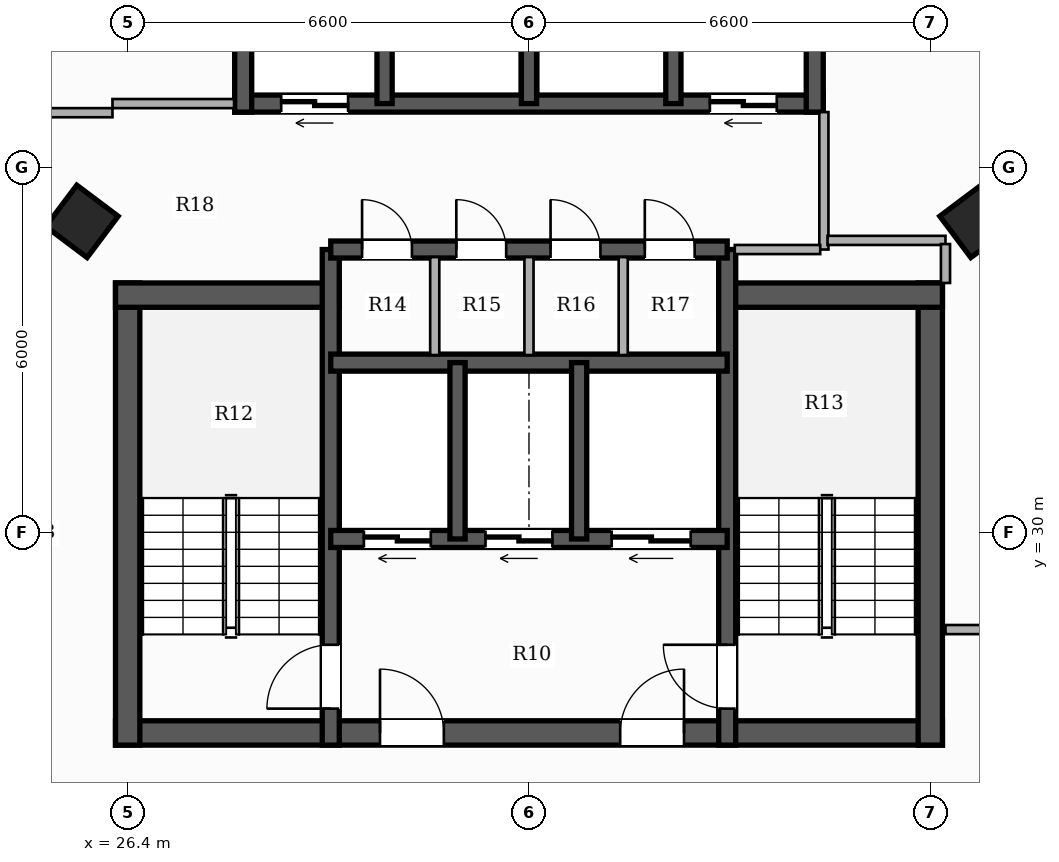
"""IFC4 building model, lengths in metres.
Left out: names, types, materials, properties, quantities, classifications, styles, units other than length and angle.
Written with IfcOpenShell. Run it as: python <this file> out.ifc"""

import sys

from ifc_helpers import new_model, si_unit, direction, frame, frame_2d, origin, origin_2d, place, context, subcontext, project, spatial, rectangle, hollow_rectangle, extrude, element, fill, save


model = new_model("IFC4")
c1 = context("Model", 3, precision=1e-05, world=origin(), true_north=direction((0.0, 1.0)))
c2 = subcontext(c1, "Body", "Model", "MODEL_VIEW")
j1 = project(units=[si_unit("LENGTHUNIT", "METRE"), si_unit("PLANEANGLEUNIT", "RADIAN")], contexts=[c1])
p1 = place(None, origin())
s1 = spatial("IfcSite", under=j1, at=p1, CompositionType="ELEMENT")
p2 = place(p1, origin())
s2 = spatial("IfcBuilding", under=s1, at=p2, CompositionType="ELEMENT")
p3 = place(p2, frame((0.0, 0.0, 157.25)))
s3 = spatial("IfcBuildingStorey", under=s2, at=p3, CompositionType="ELEMENT", Elevation=157.25)
p4 = place(p3, frame((26.2, 26.7, 0.0), z_axis=(0.0, 0.0, 1.0), x_axis=(1.0, 0.0, 0.0)))
e1 = element("IfcWall", 1, at=p4, inside=s3, PredefinedType="SHEAR", context=c2, shape_type="SweptSolid", body=[
    extrude(rectangle(XDim=13.6, YDim=0.4, at=frame_2d((6.8, 0.0))), origin(), (0.0, 0.0, 1.0), 3.3),
])
p5 = place(p4, frame((4.35, 0.0, 0.0)))
e2 = element("IfcOpeningElement", 2, at=p5, cuts=e1, PredefinedType="OPENING", context=c2, shape_type="SweptSolid", body=[
    extrude(rectangle(XDim=1.05, YDim=2.15, at=frame_2d((0.525, 1.075))), frame((0.0, 0.21, 0.0), z_axis=(0.0, -1.0, 0.0), x_axis=(1.0, 0.0, 0.0)), (0.0, 0.0, 1.0), 0.42),
])
p6 = place(p4, frame((8.3, 0.0, 0.0)))
e3 = element("IfcOpeningElement", 3, at=p6, cuts=e1, PredefinedType="OPENING", context=c2, shape_type="SweptSolid", body=[
    extrude(rectangle(XDim=1.05, YDim=2.15, at=frame_2d((0.525, 1.075))), frame((0.0, 0.21, 0.0), z_axis=(0.0, -1.0, 0.0), x_axis=(1.0, 0.0, 0.0)), (0.0, 0.0, 1.0), 0.42),
])
p7 = place(p3, frame((26.4, 26.5, 0.0), z_axis=(0.0, 0.0, 1.0), x_axis=(0.0, 1.0, 0.0)))
e4 = element("IfcWall", 4, at=p7, inside=s3, PredefinedType="SHEAR", context=c2, shape_type="SweptSolid", body=[
    extrude(rectangle(XDim=7.6, YDim=0.4, at=frame_2d((3.8, 0.0))), origin(), (0.0, 0.0, 1.0), 3.3),
])
p8 = place(p3, frame((26.2, 33.9, 0.0), z_axis=(0.0, 0.0, 1.0), x_axis=(1.0, 0.0, 0.0)))
e5 = element("IfcWall", 5, at=p8, inside=s3, PredefinedType="SHEAR", context=c2, shape_type="SweptSolid", body=[
    extrude(rectangle(XDim=3.68, YDim=0.4, at=frame_2d((1.84, 0.0))), origin(), (0.0, 0.0, 1.0), 3.3),
])
p9 = place(p3, frame((39.6, 26.5, 0.0), z_axis=(0.0, 0.0, 1.0), x_axis=(0.0, 1.0, 0.0)))
e6 = element("IfcWall", 6, at=p9, inside=s3, PredefinedType="SHEAR", context=c2, shape_type="SweptSolid", body=[
    extrude(rectangle(XDim=7.6, YDim=0.4, at=frame_2d((3.8, 0.0))), origin(), (0.0, 0.0, 1.0), 3.3),
])
p10 = place(p3, frame((36.12, 33.9, 0.0), z_axis=(0.0, 0.0, 1.0), x_axis=(1.0, 0.0, 0.0)))
e7 = element("IfcWall", 7, at=p10, inside=s3, PredefinedType="SHEAR", context=c2, shape_type="SweptSolid", body=[
    extrude(rectangle(XDim=3.68, YDim=0.4, at=frame_2d((1.84, 0.0))), origin(), (0.0, 0.0, 1.0), 3.3),
])
p11 = place(p3, frame((29.74, 26.5, 0.0), z_axis=(0.0, 0.0, 1.0), x_axis=(0.0, 1.0, 0.0)))
e8 = element("IfcWall", 8, at=p11, inside=s3, PredefinedType="SHEAR", context=c2, shape_type="SweptSolid", body=[
    extrude(rectangle(XDim=8.15, YDim=0.28, at=frame_2d((4.075, 0.0))), origin(), (0.0, 0.0, 1.0), 3.3),
])
p12 = place(p11, frame((0.6, 0.0, 0.0)))
e9 = element("IfcOpeningElement", 9, at=p12, cuts=e8, PredefinedType="OPENING", context=c2, shape_type="SweptSolid", body=[
    extrude(rectangle(XDim=1.05, YDim=2.15, at=frame_2d((0.525, 1.075))), frame((0.0, 0.15, 0.0), z_axis=(0.0, -1.0, 0.0), x_axis=(1.0, 0.0, 0.0)), (0.0, 0.0, 1.0), 0.3),
])
p13 = place(p3, frame((36.26, 26.5, 0.0), z_axis=(0.0, 0.0, 1.0), x_axis=(0.0, 1.0, 0.0)))
e10 = element("IfcWall", 10, at=p13, inside=s3, PredefinedType="SHEAR", context=c2, shape_type="SweptSolid", body=[
    extrude(rectangle(XDim=8.15, YDim=0.28, at=frame_2d((4.075, 0.0))), origin(), (0.0, 0.0, 1.0), 3.3),
])
p14 = place(p13, frame((0.6, 0.0, 0.0)))
e11 = element("IfcOpeningElement", 11, at=p14, cuts=e10, PredefinedType="OPENING", context=c2, shape_type="SweptSolid", body=[
    extrude(rectangle(XDim=1.05, YDim=2.15, at=frame_2d((0.525, 1.075))), frame((0.0, 0.15, 0.0), z_axis=(0.0, -1.0, 0.0), x_axis=(1.0, 0.0, 0.0)), (0.0, 0.0, 1.0), 0.3),
])
p15 = place(p3, frame((36.26, 29.89, 0.0), z_axis=(0.0, 0.0, 1.0), x_axis=(-1.0, 0.0, 0.0)))
e12 = element("IfcWall", 12, at=p15, inside=s3, PredefinedType="SHEAR", context=c2, shape_type="SweptSolid", body=[
    extrude(rectangle(XDim=6.52, YDim=0.28, at=frame_2d((3.26, 0.0))), origin(), (0.0, 0.0, 1.0), 3.3),
])
p16 = place(p15, frame((4.875, 0.0, 0.0)))
e13 = element("IfcOpeningElement", 13, at=p16, cuts=e12, PredefinedType="OPENING", context=c2, shape_type="SweptSolid", body=[
    extrude(rectangle(XDim=1.1, YDim=2.2, at=frame_2d((0.55, 1.1))), frame((0.0, 0.15, 0.0), z_axis=(0.0, -1.0, 0.0), x_axis=(1.0, 0.0, 0.0)), (0.0, 0.0, 1.0), 0.3),
])
p17 = place(p15, frame((2.875, 0.0, 0.0)))
e14 = element("IfcOpeningElement", 14, at=p17, cuts=e12, PredefinedType="OPENING", context=c2, shape_type="SweptSolid", body=[
    extrude(rectangle(XDim=1.1, YDim=2.2, at=frame_2d((0.55, 1.1))), frame((0.0, 0.15, 0.0), z_axis=(0.0, -1.0, 0.0), x_axis=(1.0, 0.0, 0.0)), (0.0, 0.0, 1.0), 0.3),
])
p18 = place(p15, frame((0.6, 0.0, 0.0)))
e15 = element("IfcOpeningElement", 15, at=p18, cuts=e12, PredefinedType="OPENING", context=c2, shape_type="SweptSolid", body=[
    extrude(rectangle(XDim=1.3, YDim=2.2, at=frame_2d((0.65, 1.1))), frame((0.0, 0.15, 0.0), z_axis=(0.0, -1.0, 0.0), x_axis=(1.0, 0.0, 0.0)), (0.0, 0.0, 1.0), 0.3),
])
p19 = place(p3, frame((29.74, 32.79, 0.0), z_axis=(0.0, 0.0, 1.0), x_axis=(1.0, 0.0, 0.0)))
e16 = element("IfcWall", 16, at=p19, inside=s3, PredefinedType="SHEAR", context=c2, shape_type="SweptSolid", body=[
    extrude(rectangle(XDim=6.52, YDim=0.28, at=frame_2d((3.26, 0.0))), origin(), (0.0, 0.0, 1.0), 3.3),
])
for number, where, z_axis, x_axis in (
    (17, (31.825, 29.89, 0.0), (0.0, 0.0, 1.0), (0.0, 1.0, 0.0)),
    (18, (33.825, 29.89, 0.0), (0.0, 0.0, 1.0), (0.0, 1.0, 0.0)),
):
    element("IfcWall", number, at=place(p3, frame(where, z_axis=z_axis, x_axis=x_axis)), inside=s3, PredefinedType="SHEAR", context=c2, shape_type="SweptSolid", body=[
        extrude(rectangle(XDim=2.9, YDim=0.25, at=frame_2d((1.45, 0.0))), origin(), (0.0, 0.0, 1.0), 3.3),
    ])
p20 = place(p3, frame((29.74, 34.65, 0.0), z_axis=(0.0, 0.0, 1.0), x_axis=(1.0, 0.0, 0.0)))
e19 = element("IfcWall", 19, at=p20, inside=s3, PredefinedType="SHEAR", context=c2, shape_type="SweptSolid", body=[
    extrude(rectangle(XDim=6.52, YDim=0.28, at=frame_2d((3.26, 0.0))), origin(), (0.0, 0.0, 1.0), 3.3),
])
p21 = place(p20, frame((0.515, 0.0, 0.0)))
e20 = element("IfcOpeningElement", 20, at=p21, cuts=e19, PredefinedType="OPENING", context=c2, shape_type="SweptSolid", body=[
    extrude(rectangle(XDim=0.82, YDim=2.1, at=frame_2d((0.41, 1.05))), frame((0.0, 0.15, 0.0), z_axis=(0.0, -1.0, 0.0), x_axis=(1.0, 0.0, 0.0)), (0.0, 0.0, 1.0), 0.3),
])
p22 = place(p20, frame((2.065, 0.0, 0.0)))
e21 = element("IfcOpeningElement", 21, at=p22, cuts=e19, PredefinedType="OPENING", context=c2, shape_type="SweptSolid", body=[
    extrude(rectangle(XDim=0.82, YDim=2.1, at=frame_2d((0.41, 1.05))), frame((0.0, 0.15, 0.0), z_axis=(0.0, -1.0, 0.0), x_axis=(1.0, 0.0, 0.0)), (0.0, 0.0, 1.0), 0.3),
])
p23 = place(p20, frame((3.615, 0.0, 0.0)))
e22 = element("IfcOpeningElement", 22, at=p23, cuts=e19, PredefinedType="OPENING", context=c2, shape_type="SweptSolid", body=[
    extrude(rectangle(XDim=0.82, YDim=2.1, at=frame_2d((0.41, 1.05))), frame((0.0, 0.15, 0.0), z_axis=(0.0, -1.0, 0.0), x_axis=(1.0, 0.0, 0.0)), (0.0, 0.0, 1.0), 0.3),
])
p24 = place(p20, frame((5.165, 0.0, 0.0)))
e23 = element("IfcOpeningElement", 23, at=p24, cuts=e19, PredefinedType="OPENING", context=c2, shape_type="SweptSolid", body=[
    extrude(rectangle(XDim=0.82, YDim=2.1, at=frame_2d((0.41, 1.05))), frame((0.0, 0.15, 0.0), z_axis=(0.0, -1.0, 0.0), x_axis=(1.0, 0.0, 0.0)), (0.0, 0.0, 1.0), 0.3),
])
p25 = place(p3, frame((37.84, 37.05, 0.0), z_axis=(0.0, 0.0, 1.0), x_axis=(-1.0, 0.0, 0.0)))
e24 = element("IfcWall", 24, at=p25, inside=s3, PredefinedType="SHEAR", context=c2, shape_type="SweptSolid", body=[
    extrude(rectangle(XDim=9.68, YDim=0.28, at=frame_2d((4.84, 0.0))), origin(), (0.0, 0.0, 1.0), 3.3),
])
p26 = place(p25, frame((7.815, 0.0, 0.0)))
e25 = element("IfcOpeningElement", 25, at=p26, cuts=e24, PredefinedType="OPENING", context=c2, shape_type="SweptSolid", body=[
    extrude(rectangle(XDim=1.1, YDim=2.2, at=frame_2d((0.55, 1.1))), frame((0.0, 0.15, 0.0), z_axis=(0.0, -1.0, 0.0), x_axis=(1.0, 0.0, 0.0)), (0.0, 0.0, 1.0), 0.3),
])
p27 = place(p25, frame((0.765, 0.0, 0.0)))
e26 = element("IfcOpeningElement", 26, at=p27, cuts=e24, PredefinedType="OPENING", context=c2, shape_type="SweptSolid", body=[
    extrude(rectangle(XDim=1.1, YDim=2.2, at=frame_2d((0.55, 1.1))), frame((0.0, 0.15, 0.0), z_axis=(0.0, -1.0, 0.0), x_axis=(1.0, 0.0, 0.0)), (0.0, 0.0, 1.0), 0.3),
])
for number, where, z_axis, x_axis in (
    (27, (28.3, 36.91, 0.0), (0.0, 0.0, 1.0), (0.0, 1.0, 0.0)),
    (28, (37.7, 36.91, 0.0), (0.0, 0.0, 1.0), (0.0, 1.0, 0.0)),
):
    element("IfcWall", number, at=place(p3, frame(where, z_axis=z_axis, x_axis=x_axis)), inside=s3, PredefinedType="SHEAR", context=c2, shape_type="SweptSolid", body=[
        extrude(rectangle(XDim=2.83, YDim=0.28, at=frame_2d((1.415, 0.0))), origin(), (0.0, 0.0, 1.0), 3.3),
    ])
for number, where, z_axis, x_axis in (
    (29, (30.625, 37.05, 0.0), (0.0, 0.0, 1.0), (0.0, 1.0, 0.0)),
    (30, (33.0, 37.05, 0.0), (0.0, 0.0, 1.0), (0.0, 1.0, 0.0)),
    (31, (35.375, 37.05, 0.0), (0.0, 0.0, 1.0), (0.0, 1.0, 0.0)),
):
    element("IfcWall", number, at=place(p3, frame(where, z_axis=z_axis, x_axis=x_axis)), inside=s3, PredefinedType="SHEAR", context=c2, shape_type="SweptSolid", body=[
        extrude(rectangle(XDim=2.55, YDim=0.25, at=frame_2d((1.275, 0.0))), origin(), (0.0, 0.0, 1.0), 3.3),
    ])
for number, where, z_axis, x_axis in (
    (32, (25.648, 35.113, 0.0), (0.0, 0.0, 1.0), (0.6, 0.8, 0.0)),
    (33, (40.352, 35.113, 0.0), (0.0, 0.0, 1.0), (-0.6, 0.8, 0.0)),
):
    element("IfcColumn", number, at=place(p3, frame(where, z_axis=z_axis, x_axis=x_axis)), inside=s3, PredefinedType="COLUMN", context=c2, shape_type="SweptSolid", body=[
        extrude(hollow_rectangle(XDim=0.85, YDim=0.85, WallThickness=0.028, at=origin_2d()), origin(), (0.0, 0.0, 1.0), 3.3),
    ])
p28 = place(p3, frame((37.85, 34.65, 0.0), z_axis=(0.0, 0.0, 1.0), x_axis=(0.0, 1.0, 0.0)))
e34 = element("IfcWall", 34, at=p28, inside=s3, PredefinedType="PARTITIONING", context=c2, shape_type="SweptSolid", body=[
    extrude(rectangle(XDim=2.26, YDim=0.15, at=frame_2d((1.13, 0.0))), origin(), (0.0, 0.0, 1.0), 3.06),
])
p29 = place(p3, frame((36.385, 34.65, 0.0), z_axis=(0.0, 0.0, 1.0), x_axis=(1.0, 0.0, 0.0)))
e35 = element("IfcWall", 35, at=p29, inside=s3, PredefinedType="PARTITIONING", context=c2, shape_type="SweptSolid", body=[
    extrude(rectangle(XDim=1.405, YDim=0.15, at=frame_2d((0.703, 0.0))), origin(), (0.0, 0.0, 1.0), 2.425),
])
for number, where, z_axis, x_axis in (
    (36, (31.45, 32.915, 0.0), (0.0, 0.0, 1.0), (0.0, 1.0, 0.0)),
    (37, (33.0, 32.915, 0.0), (0.0, 0.0, 1.0), (0.0, 1.0, 0.0)),
    (38, (34.55, 32.915, 0.0), (0.0, 0.0, 1.0), (0.0, 1.0, 0.0)),
):
    element("IfcWall", number, at=place(p3, frame(where, z_axis=z_axis, x_axis=x_axis)), inside=s3, PredefinedType="PARTITIONING", context=c2, shape_type="SweptSolid", body=[
        extrude(rectangle(XDim=1.61, YDim=0.15, at=frame_2d((0.805, 0.0))), origin(), (0.0, 0.0, 1.0), 3.06),
    ])
p30 = place(p3, frame((23.56, 36.9, 0.0), z_axis=(0.0, 0.0, 1.0), x_axis=(1.0, 0.0, 0.0)))
e39 = element("IfcWall", 39, at=p30, inside=s3, PredefinedType="PARTITIONING", context=c2, shape_type="SweptSolid", body=[
    extrude(rectangle(XDim=2.59, YDim=0.15, at=frame_2d((1.295, 0.0))), origin(), (0.0, 0.0, 1.0), 2.413),
])
p31 = place(p3, frame((39.85, 28.4, 0.0), z_axis=(0.0, 0.0, 1.0), x_axis=(1.0, 0.0, 0.0)))
e40 = element("IfcWall", 40, at=p31, inside=s3, PredefinedType="PARTITIONING", context=c2, shape_type="SweptSolid", body=[
    extrude(rectangle(XDim=2.5, YDim=0.15, at=frame_2d((1.25, 0.0))), origin(), (0.0, 0.0, 1.0), 2.721),
])
p32 = place(p31, frame((0.79, 0.0, 0.0)))
e41 = element("IfcOpeningElement", 41, at=p32, cuts=e40, PredefinedType="OPENING", context=c2, shape_type="SweptSolid", body=[
    extrude(rectangle(XDim=0.92, YDim=2.15, at=frame_2d((0.46, 1.075))), frame((0.0, 0.085, 0.0), z_axis=(0.0, -1.0, 0.0), x_axis=(1.0, 0.0, 0.0)), (0.0, 0.0, 1.0), 0.17),
])
p33 = place(p3, frame((26.15, 37.05, 0.0), z_axis=(0.0, 0.0, 1.0), x_axis=(1.0, 0.0, 0.0)))
e42 = element("IfcWall", 42, at=p33, inside=s3, PredefinedType="PARTITIONING", context=c2, shape_type="SweptSolid", body=[
    extrude(rectangle(XDim=2.0, YDim=0.15, at=frame_2d((1.0, 0.0))), origin(), (0.0, 0.0, 1.0), 2.413),
])
p34 = place(p3, frame((37.91, 34.8, 0.0), z_axis=(0.0, 0.0, 1.0), x_axis=(1.0, 0.0, 0.0)))
e43 = element("IfcWall", 43, at=p34, inside=s3, PredefinedType="PARTITIONING", context=c2, shape_type="SweptSolid", body=[
    extrude(rectangle(XDim=1.94, YDim=0.15, at=frame_2d((0.97, 0.0))), origin(), (0.0, 0.0, 1.0), 2.721),
])
p35 = place(p3, frame((39.85, 34.74, 0.0), z_axis=(0.0, 0.0, 1.0), x_axis=(0.0, -1.0, 0.0)))
e44 = element("IfcWall", 44, at=p35, inside=s3, PredefinedType="PARTITIONING", context=c2, shape_type="SweptSolid", body=[
    extrude(rectangle(XDim=0.64, YDim=0.15, at=frame_2d((0.32, 0.0))), origin(), (0.0, 0.0, 1.0), 2.721),
])
p36 = place(p12, origin())
e45 = element("IfcDoor", 45, at=p36, inside=s3, OperationType="SINGLE_SWING_LEFT", PredefinedType="DOOR", context=c2, shape_type="SweptSolid", body=[
    extrude(rectangle(XDim=1.05, YDim=2.15, at=frame_2d((0.525, 1.075))), frame((0.0, 0.025, 0.0), z_axis=(0.0, -1.0, 0.0), x_axis=(1.0, 0.0, 0.0)), (0.0, 0.0, 1.0), 0.05),
])
fill(e9, e45)
p37 = place(p14, origin())
e46 = element("IfcDoor", 46, at=p37, inside=s3, OperationType="SINGLE_SWING_RIGHT", PredefinedType="DOOR", context=c2, shape_type="SweptSolid", body=[
    extrude(rectangle(XDim=1.05, YDim=2.15, at=frame_2d((0.525, 1.075))), frame((0.0, 0.025, 0.0), z_axis=(0.0, -1.0, 0.0), x_axis=(1.0, 0.0, 0.0)), (0.0, 0.0, 1.0), 0.05),
])
fill(e11, e46)
p38 = place(p5, origin())
e47 = element("IfcDoor", 47, at=p38, inside=s3, OperationType="SINGLE_SWING_LEFT", PredefinedType="DOOR", context=c2, shape_type="SweptSolid", body=[
    extrude(rectangle(XDim=1.05, YDim=2.15, at=frame_2d((0.525, 1.075))), frame((0.0, 0.025, 0.0), z_axis=(0.0, -1.0, 0.0), x_axis=(1.0, 0.0, 0.0)), (0.0, 0.0, 1.0), 0.05),
])
fill(e2, e47)
p39 = place(p6, origin())
e48 = element("IfcDoor", 48, at=p39, inside=s3, OperationType="SINGLE_SWING_RIGHT", PredefinedType="DOOR", context=c2, shape_type="SweptSolid", body=[
    extrude(rectangle(XDim=1.05, YDim=2.15, at=frame_2d((0.525, 1.075))), frame((0.0, 0.025, 0.0), z_axis=(0.0, -1.0, 0.0), x_axis=(1.0, 0.0, 0.0)), (0.0, 0.0, 1.0), 0.05),
])
fill(e3, e48)
p40 = place(p16, origin())
e49 = element("IfcDoor", 49, at=p40, inside=s3, OperationType="DOUBLE_DOOR_SLIDING", PredefinedType="DOOR", context=c2, shape_type="SweptSolid", body=[
    extrude(rectangle(XDim=1.1, YDim=2.2, at=frame_2d((0.55, 1.1))), frame((0.0, 0.025, 0.0), z_axis=(0.0, -1.0, 0.0), x_axis=(1.0, 0.0, 0.0)), (0.0, 0.0, 1.0), 0.05),
])
fill(e13, e49)
p41 = place(p17, origin())
e50 = element("IfcDoor", 50, at=p41, inside=s3, OperationType="DOUBLE_DOOR_SLIDING", PredefinedType="DOOR", context=c2, shape_type="SweptSolid", body=[
    extrude(rectangle(XDim=1.1, YDim=2.2, at=frame_2d((0.55, 1.1))), frame((0.0, 0.025, 0.0), z_axis=(0.0, -1.0, 0.0), x_axis=(1.0, 0.0, 0.0)), (0.0, 0.0, 1.0), 0.05),
])
fill(e14, e50)
p42 = place(p18, origin())
e51 = element("IfcDoor", 51, at=p42, inside=s3, OperationType="DOUBLE_DOOR_SLIDING", PredefinedType="DOOR", context=c2, shape_type="SweptSolid", body=[
    extrude(rectangle(XDim=1.3, YDim=2.2, at=frame_2d((0.65, 1.1))), frame((0.0, 0.025, 0.0), z_axis=(0.0, -1.0, 0.0), x_axis=(1.0, 0.0, 0.0)), (0.0, 0.0, 1.0), 0.05),
])
fill(e15, e51)
p43 = place(p26, origin())
e52 = element("IfcDoor", 52, at=p43, inside=s3, OperationType="DOUBLE_DOOR_SLIDING", PredefinedType="DOOR", context=c2, shape_type="SweptSolid", body=[
    extrude(rectangle(XDim=1.1, YDim=2.2, at=frame_2d((0.55, 1.1))), frame((0.0, 0.025, 0.0), z_axis=(0.0, -1.0, 0.0), x_axis=(1.0, 0.0, 0.0)), (0.0, 0.0, 1.0), 0.05),
])
fill(e25, e52)
p44 = place(p27, origin())
e53 = element("IfcDoor", 53, at=p44, inside=s3, OperationType="DOUBLE_DOOR_SLIDING", PredefinedType="DOOR", context=c2, shape_type="SweptSolid", body=[
    extrude(rectangle(XDim=1.1, YDim=2.2, at=frame_2d((0.55, 1.1))), frame((0.0, 0.025, 0.0), z_axis=(0.0, -1.0, 0.0), x_axis=(1.0, 0.0, 0.0)), (0.0, 0.0, 1.0), 0.05),
])
fill(e26, e53)
p45 = place(p21, origin())
e54 = element("IfcDoor", 54, at=p45, inside=s3, OperationType="SINGLE_SWING_LEFT", PredefinedType="DOOR", context=c2, shape_type="SweptSolid", body=[
    extrude(rectangle(XDim=0.82, YDim=2.1, at=frame_2d((0.41, 1.05))), frame((0.0, 0.025, 0.0), z_axis=(0.0, -1.0, 0.0), x_axis=(1.0, 0.0, 0.0)), (0.0, 0.0, 1.0), 0.05),
])
fill(e20, e54)
p46 = place(p22, origin())
e55 = element("IfcDoor", 55, at=p46, inside=s3, OperationType="SINGLE_SWING_LEFT", PredefinedType="DOOR", context=c2, shape_type="SweptSolid", body=[
    extrude(rectangle(XDim=0.82, YDim=2.1, at=frame_2d((0.41, 1.05))), frame((0.0, 0.025, 0.0), z_axis=(0.0, -1.0, 0.0), x_axis=(1.0, 0.0, 0.0)), (0.0, 0.0, 1.0), 0.05),
])
fill(e21, e55)
p47 = place(p23, origin())
e56 = element("IfcDoor", 56, at=p47, inside=s3, OperationType="SINGLE_SWING_LEFT", PredefinedType="DOOR", context=c2, shape_type="SweptSolid", body=[
    extrude(rectangle(XDim=0.82, YDim=2.1, at=frame_2d((0.41, 1.05))), frame((0.0, 0.025, 0.0), z_axis=(0.0, -1.0, 0.0), x_axis=(1.0, 0.0, 0.0)), (0.0, 0.0, 1.0), 0.05),
])
fill(e22, e56)
p48 = place(p24, origin())
e57 = element("IfcDoor", 57, at=p48, inside=s3, OperationType="SINGLE_SWING_LEFT", PredefinedType="DOOR", context=c2, shape_type="SweptSolid", body=[
    extrude(rectangle(XDim=0.82, YDim=2.1, at=frame_2d((0.41, 1.05))), frame((0.0, 0.025, 0.0), z_axis=(0.0, -1.0, 0.0), x_axis=(1.0, 0.0, 0.0)), (0.0, 0.0, 1.0), 0.05),
])
fill(e23, e57)
save(model, sys.argv[1])
